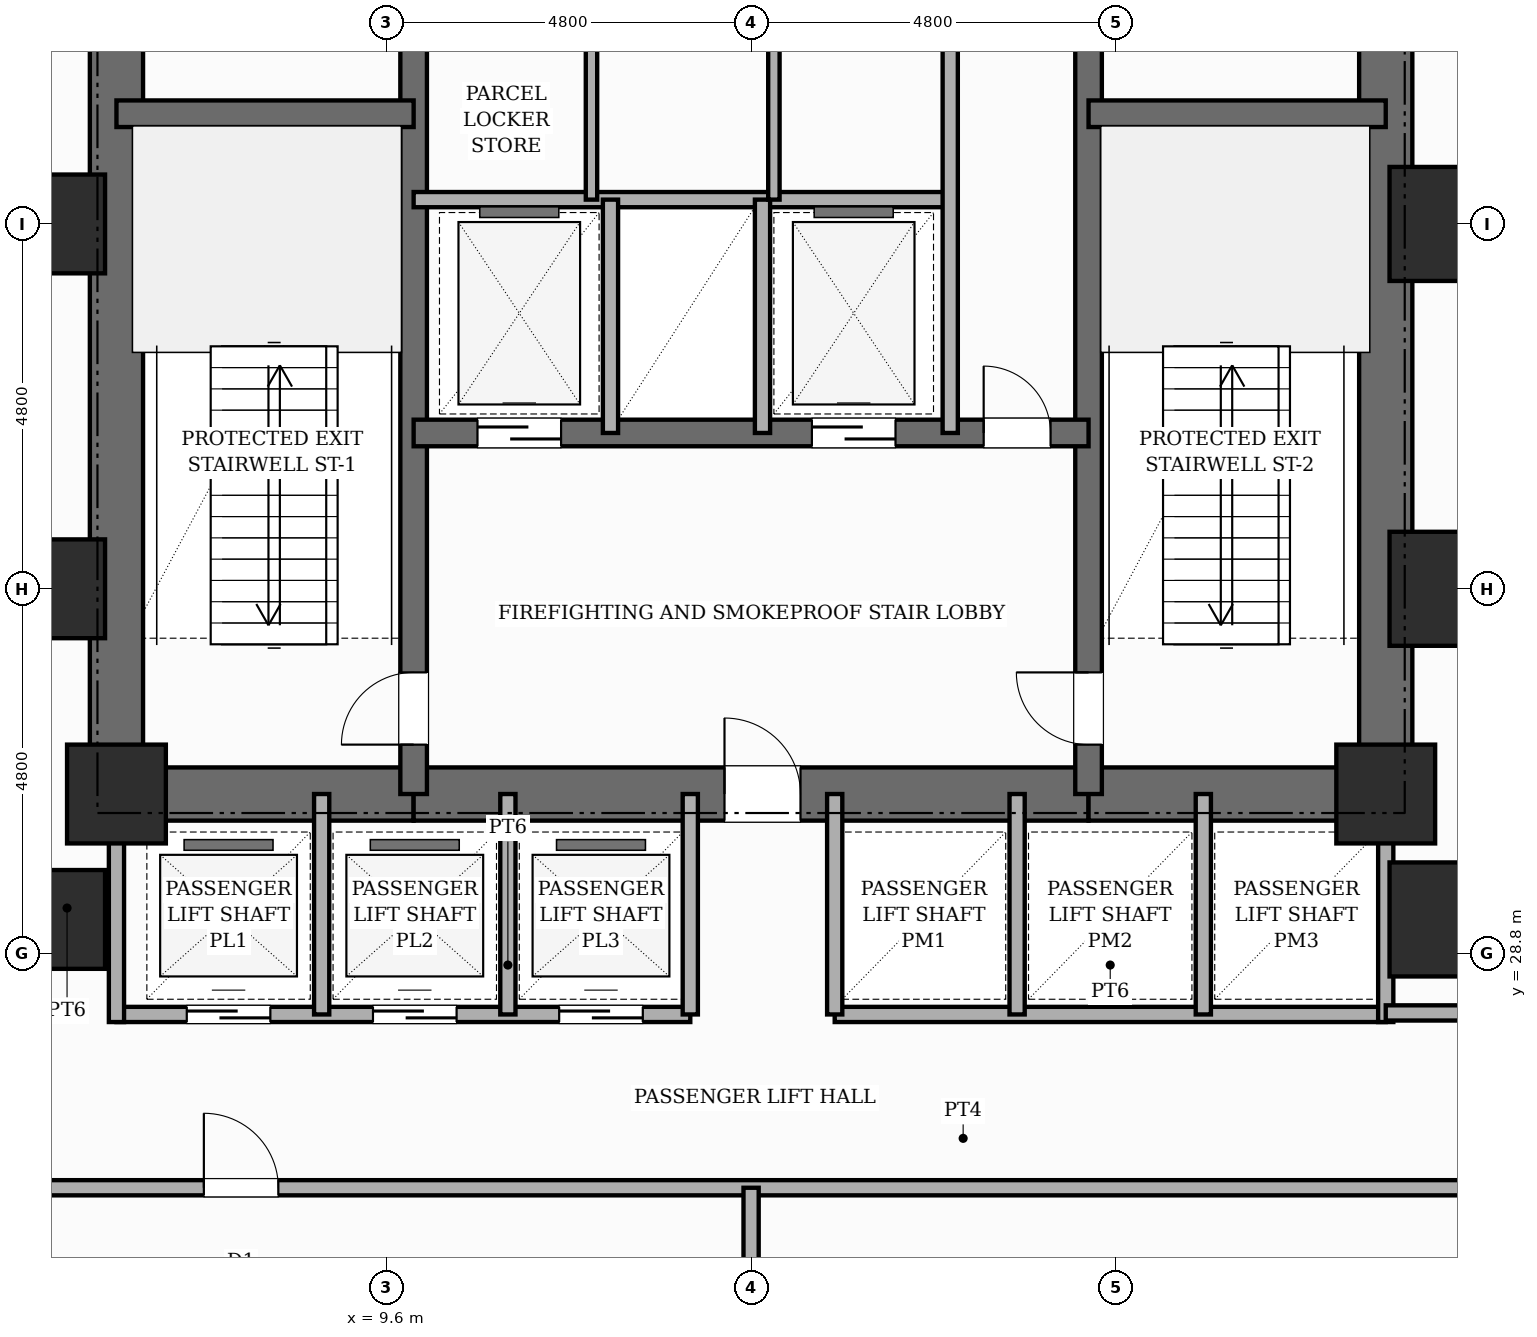
"""IFC4 building model, lengths in metres.
Left out: names, types, materials, properties, quantities, classifications, styles, units other than length and angle.
Written with IfcOpenShell. Run it as: python <this file> out.ifc"""

import sys

from ifc_helpers import new_model, si_unit, direction, frame, frame_2d, origin, origin_2d, place, context, subcontext, project, spatial, rectangle, extrude, element, fill, save


model = new_model("IFC4")
c1 = context("Model", 3, precision=1e-05, world=origin(), true_north=direction((0.0, 1.0)))
c2 = subcontext(c1, "Body", "Model", "MODEL_VIEW")
j1 = project(units=[si_unit("LENGTHUNIT", "METRE"), si_unit("PLANEANGLEUNIT", "RADIAN")], contexts=[c1])
p1 = place(None, origin())
s1 = spatial("IfcSite", under=j1, at=p1, CompositionType="ELEMENT")
p2 = place(p1, origin())
s2 = spatial("IfcBuilding", under=s1, at=p2, CompositionType="ELEMENT")
p3 = place(p2, frame((0.0, 0.0, 19.6)))
s3 = spatial("IfcBuildingStorey", under=s2, at=p3, CompositionType="ELEMENT", Elevation=19.6)
p4 = place(p3, frame((6.05, 30.55, 0.0), z_axis=(0.0, 0.0, 1.0), x_axis=(0.0, 1.0, 0.0)))
e1 = element("IfcWall", 1, at=p4, inside=s3, PredefinedType="SHEAR", context=c2, shape_type="SweptSolid", body=[
    extrude(rectangle(XDim=15.6, YDim=0.7, at=frame_2d((7.8, 0.0))), origin(), (0.0, 0.0, 1.0), 5.4),
])
p5 = place(p3, frame((22.75, 30.55, 0.0), z_axis=(0.0, 0.0, 1.0), x_axis=(0.0, 1.0, 0.0)))
e2 = element("IfcWall", 2, at=p5, inside=s3, PredefinedType="SHEAR", context=c2, shape_type="SweptSolid", body=[
    extrude(rectangle(XDim=15.6, YDim=0.7, at=frame_2d((7.8, 0.0))), origin(), (0.0, 0.0, 1.0), 5.4),
])
p6 = place(p5, frame((10.8, 0.0, 0.0)))
e3 = element("IfcOpeningElement", 3, at=p6, cuts=e2, PredefinedType="OPENING", context=c2, shape_type="SweptSolid", body=[
    extrude(rectangle(XDim=1.0, YDim=2.15, at=frame_2d((0.5, 1.075))), frame((0.0, 0.36, 0.0), z_axis=(0.0, -1.0, 0.0), x_axis=(1.0, 0.0, 0.0)), (0.0, 0.0, 1.0), 0.72),
])
p7 = place(p3, frame((6.05, 30.9, 0.0), z_axis=(0.0, 0.0, 1.0), x_axis=(1.0, 0.0, 0.0)))
e4 = element("IfcWall", 4, at=p7, inside=s3, PredefinedType="SHEAR", context=c2, shape_type="SweptSolid", body=[
    extrude(rectangle(XDim=3.91, YDim=0.7, at=frame_2d((1.955, 0.0))), origin(), (0.0, 0.0, 1.0), 5.4),
])
p8 = place(p3, frame((9.96, 30.9, 0.0), z_axis=(0.0, 0.0, 1.0), x_axis=(1.0, 0.0, 0.0)))
e5 = element("IfcWall", 5, at=p8, inside=s3, PredefinedType="SHEAR", context=c2, shape_type="SweptSolid", body=[
    extrude(rectangle(XDim=8.88, YDim=0.7, at=frame_2d((4.44, 0.0))), origin(), (0.0, 0.0, 1.0), 5.4),
])
p9 = place(p8, frame((4.09, 0.0, 0.0)))
e6 = element("IfcOpeningElement", 6, at=p9, cuts=e5, PredefinedType="OPENING", context=c2, shape_type="SweptSolid", body=[
    extrude(rectangle(XDim=1.0, YDim=2.15, at=frame_2d((0.5, 1.075))), frame((0.0, 0.36, 0.0), z_axis=(0.0, -1.0, 0.0), x_axis=(1.0, 0.0, 0.0)), (0.0, 0.0, 1.0), 0.72),
])
p10 = place(p3, frame((18.84, 30.9, 0.0), z_axis=(0.0, 0.0, 1.0), x_axis=(1.0, 0.0, 0.0)))
e7 = element("IfcWall", 7, at=p10, inside=s3, PredefinedType="SHEAR", context=c2, shape_type="SweptSolid", body=[
    extrude(rectangle(XDim=3.91, YDim=0.7, at=frame_2d((1.955, 0.0))), origin(), (0.0, 0.0, 1.0), 5.4),
])
p11 = place(p3, frame((9.96, 30.9, 0.0), z_axis=(0.0, 0.0, 1.0), x_axis=(0.0, 1.0, 0.0)))
e8 = element("IfcWall", 8, at=p11, inside=s3, PredefinedType="SHEAR", context=c2, shape_type="SweptSolid", body=[
    extrude(rectangle(XDim=14.9, YDim=0.35, at=frame_2d((7.45, 0.0))), origin(), (0.0, 0.0, 1.0), 5.4),
])
p12 = place(p11, frame((0.65, 0.0, 0.0)))
e9 = element("IfcOpeningElement", 9, at=p12, cuts=e8, PredefinedType="OPENING", context=c2, shape_type="SweptSolid", body=[
    extrude(rectangle(XDim=0.95, YDim=2.1, at=frame_2d((0.475, 1.05))), frame((0.0, 0.185, 0.0), z_axis=(0.0, -1.0, 0.0), x_axis=(1.0, 0.0, 0.0)), (0.0, 0.0, 1.0), 0.37),
])
p13 = place(p11, frame((10.45, 0.0, 0.0)))
e10 = element("IfcOpeningElement", 10, at=p13, cuts=e8, PredefinedType="OPENING", context=c2, shape_type="SweptSolid", body=[
    extrude(rectangle(XDim=1.0, YDim=2.15, at=frame_2d((0.5, 1.075))), frame((0.0, 0.185, 0.0), z_axis=(0.0, -1.0, 0.0), x_axis=(1.0, 0.0, 0.0)), (0.0, 0.0, 1.0), 0.37),
])
p14 = place(p3, frame((18.84, 30.9, 0.0), z_axis=(0.0, 0.0, 1.0), x_axis=(0.0, 1.0, 0.0)))
e11 = element("IfcWall", 11, at=p14, inside=s3, PredefinedType="SHEAR", context=c2, shape_type="SweptSolid", body=[
    extrude(rectangle(XDim=14.9, YDim=0.35, at=frame_2d((7.45, 0.0))), origin(), (0.0, 0.0, 1.0), 5.4),
])
p15 = place(p14, frame((0.65, 0.0, 0.0)))
e12 = element("IfcOpeningElement", 12, at=p15, cuts=e11, PredefinedType="OPENING", context=c2, shape_type="SweptSolid", body=[
    extrude(rectangle(XDim=0.95, YDim=2.1, at=frame_2d((0.475, 1.05))), frame((0.0, 0.185, 0.0), z_axis=(0.0, -1.0, 0.0), x_axis=(1.0, 0.0, 0.0)), (0.0, 0.0, 1.0), 0.37),
])
p16 = place(p14, frame((10.45, 0.0, 0.0)))
e13 = element("IfcOpeningElement", 13, at=p16, cuts=e11, PredefinedType="OPENING", context=c2, shape_type="SweptSolid", body=[
    extrude(rectangle(XDim=1.0, YDim=2.15, at=frame_2d((0.5, 1.075))), frame((0.0, 0.185, 0.0), z_axis=(0.0, -1.0, 0.0), x_axis=(1.0, 0.0, 0.0)), (0.0, 0.0, 1.0), 0.37),
])
for number, where, z_axis, x_axis in (
    (14, (6.05, 39.85, 0.0), (0.0, 0.0, 1.0), (1.0, 0.0, 0.0)),
    (15, (18.84, 39.85, 0.0), (0.0, 0.0, 1.0), (1.0, 0.0, 0.0)),
):
    element("IfcWall", number, at=place(p3, frame(where, z_axis=z_axis, x_axis=x_axis)), inside=s3, PredefinedType="SHEAR", context=c2, shape_type="SweptSolid", body=[
        extrude(rectangle(XDim=3.91, YDim=0.35, at=frame_2d((1.955, 0.0))), origin(), (0.0, 0.0, 1.0), 5.4),
    ])
p17 = place(p3, frame((9.96, 35.65, 0.0), z_axis=(0.0, 0.0, 1.0), x_axis=(1.0, 0.0, 0.0)))
e16 = element("IfcWall", 16, at=p17, inside=s3, PredefinedType="SHEAR", context=c2, shape_type="SweptSolid", body=[
    extrude(rectangle(XDim=8.88, YDim=0.35, at=frame_2d((4.44, 0.0))), origin(), (0.0, 0.0, 1.0), 5.4),
])
p18 = place(p17, frame((0.84, 0.0, 0.0)))
e17 = element("IfcOpeningElement", 17, at=p18, cuts=e16, PredefinedType="OPENING", context=c2, shape_type="SweptSolid", body=[
    extrude(rectangle(XDim=1.1, YDim=2.15, at=frame_2d((0.55, 1.075))), frame((0.0, 0.185, 0.0), z_axis=(0.0, -1.0, 0.0), x_axis=(1.0, 0.0, 0.0)), (0.0, 0.0, 1.0), 0.37),
])
p19 = place(p17, frame((5.24, 0.0, 0.0)))
e18 = element("IfcOpeningElement", 18, at=p19, cuts=e16, PredefinedType="OPENING", context=c2, shape_type="SweptSolid", body=[
    extrude(rectangle(XDim=1.1, YDim=2.15, at=frame_2d((0.55, 1.075))), frame((0.0, 0.185, 0.0), z_axis=(0.0, -1.0, 0.0), x_axis=(1.0, 0.0, 0.0)), (0.0, 0.0, 1.0), 0.37),
])
p20 = place(p17, frame((7.5, 0.0, 0.0)))
e19 = element("IfcOpeningElement", 19, at=p20, cuts=e16, PredefinedType="OPENING", context=c2, shape_type="SweptSolid", body=[
    extrude(rectangle(XDim=0.88, YDim=2.1, at=frame_2d((0.44, 1.05))), frame((0.0, 0.185, 0.0), z_axis=(0.0, -1.0, 0.0), x_axis=(1.0, 0.0, 0.0)), (0.0, 0.0, 1.0), 0.37),
])
for number, where, z_axis, x_axis in (
    (20, (5.25, 29.25, 0.0), (0.0, 0.0, 1.0), (1.0, 0.0, 0.0)),
    (21, (5.25, 33.6, 0.0), (0.0, 0.0, 1.0), (1.0, 0.0, 0.0)),
    (22, (5.25, 38.4, 0.0), (0.0, 0.0, 1.0), (1.0, 0.0, 0.0)),
    (23, (6.05, 30.9, 0.0), (0.0, 0.0, 1.0), (1.0, 0.0, 0.0)),
    (24, (22.75, 30.9, 0.0), (0.0, 0.0, 1.0), (1.0, 0.0, 0.0)),
):
    element("IfcColumn", number, at=place(p3, frame(where, z_axis=z_axis, x_axis=x_axis)), inside=s3, PredefinedType="COLUMN", context=c2, shape_type="SweptSolid", body=[
        extrude(rectangle(XDim=1.3, YDim=1.3, at=origin_2d()), origin(), (0.0, 0.0, 1.0), 5.4),
    ])
for number, where, z_axis, x_axis in (
    (25, (23.55, 29.25, 0.0), (0.0, 0.0, 1.0), (1.0, 0.0, 0.0)),
    (26, (23.55, 33.6, 0.0), (0.0, 0.0, 1.0), (1.0, 0.0, 0.0)),
    (27, (23.55, 38.4, 0.0), (0.0, 0.0, 1.0), (1.0, 0.0, 0.0)),
):
    element("IfcColumn", number, at=place(p3, frame(where, z_axis=z_axis, x_axis=x_axis)), inside=s3, PredefinedType="USERDEFINED", context=c2, shape_type="SweptSolid", body=[
        extrude(rectangle(XDim=1.5, YDim=1.5, at=origin_2d()), origin(), (0.0, 0.0, 1.0), 5.4),
    ])
p21 = place(p3, frame((9.96, 38.72, 0.0), z_axis=(0.0, 0.0, 1.0), x_axis=(1.0, 0.0, 0.0)))
e28 = element("IfcWall", 28, at=p21, inside=s3, PredefinedType="POLYGONAL", context=c2, shape_type="SweptSolid", body=[
    extrude(rectangle(XDim=7.06, YDim=0.2, at=frame_2d((3.53, 0.0))), origin(), (0.0, 0.0, 1.0), 5.15),
])
for number, where, z_axis, x_axis in (
    (29, (12.55, 35.65, 0.0), (0.0, 0.0, 1.0), (0.0, 1.0, 0.0)),
    (30, (14.55, 35.65, 0.0), (0.0, 0.0, 1.0), (0.0, 1.0, 0.0)),
):
    element("IfcWall", number, at=place(p3, frame(where, z_axis=z_axis, x_axis=x_axis)), inside=s3, PredefinedType="POLYGONAL", context=c2, shape_type="SweptSolid", body=[
        extrude(rectangle(XDim=3.07, YDim=0.2, at=frame_2d((1.535, 0.0))), origin(), (0.0, 0.0, 1.0), 5.15),
    ])
p22 = place(p3, frame((17.02, 35.65, 0.0), z_axis=(0.0, 0.0, 1.0), x_axis=(0.0, 1.0, 0.0)))
e31 = element("IfcWall", 31, at=p22, inside=s3, PredefinedType="POLYGONAL", context=c2, shape_type="SweptSolid", body=[
    extrude(rectangle(XDim=5.15, YDim=0.2, at=frame_2d((2.575, 0.0))), origin(), (0.0, 0.0, 1.0), 5.15),
])
for number, where, z_axis, x_axis in (
    (32, (12.3, 38.72, 0.0), (0.0, 0.0, 1.0), (0.0, 1.0, 0.0)),
    (33, (14.7, 38.72, 0.0), (0.0, 0.0, 1.0), (0.0, 1.0, 0.0)),
):
    element("IfcWall", number, at=place(p3, frame(where, z_axis=z_axis, x_axis=x_axis)), inside=s3, PredefinedType="PARTITIONING", context=c2, shape_type="SweptSolid", body=[
        extrude(rectangle(XDim=2.08, YDim=0.15, at=frame_2d((1.04, 0.0))), origin(), (0.0, 0.0, 1.0), 5.15),
    ])
p23 = place(p3, frame((6.05, 28.0, 0.0), z_axis=(0.0, 0.0, 1.0), x_axis=(1.0, 0.0, 0.0)))
e34 = element("IfcWall", 34, at=p23, inside=s3, PredefinedType="POLYGONAL", context=c2, shape_type="SweptSolid", body=[
    extrude(rectangle(XDim=7.55, YDim=0.2, at=frame_2d((3.775, 0.0))), origin(), (0.0, 0.0, 1.0), 5.15),
])
p24 = place(p23, frame((0.925, 0.0, 0.0)))
e35 = element("IfcOpeningElement", 35, at=p24, cuts=e34, PredefinedType="OPENING", context=c2, shape_type="SweptSolid", body=[
    extrude(rectangle(XDim=1.1, YDim=2.15, at=frame_2d((0.55, 1.075))), frame((0.0, 0.11, 0.0), z_axis=(0.0, -1.0, 0.0), x_axis=(1.0, 0.0, 0.0)), (0.0, 0.0, 1.0), 0.22),
])
p25 = place(p23, frame((3.375, 0.0, 0.0)))
e36 = element("IfcOpeningElement", 36, at=p25, cuts=e34, PredefinedType="OPENING", context=c2, shape_type="SweptSolid", body=[
    extrude(rectangle(XDim=1.1, YDim=2.15, at=frame_2d((0.55, 1.075))), frame((0.0, 0.11, 0.0), z_axis=(0.0, -1.0, 0.0), x_axis=(1.0, 0.0, 0.0)), (0.0, 0.0, 1.0), 0.22),
])
p26 = place(p23, frame((5.825, 0.0, 0.0)))
e37 = element("IfcOpeningElement", 37, at=p26, cuts=e34, PredefinedType="OPENING", context=c2, shape_type="SweptSolid", body=[
    extrude(rectangle(XDim=1.1, YDim=2.15, at=frame_2d((0.55, 1.075))), frame((0.0, 0.11, 0.0), z_axis=(0.0, -1.0, 0.0), x_axis=(1.0, 0.0, 0.0)), (0.0, 0.0, 1.0), 0.22),
])
p27 = place(p3, frame((15.5, 28.0, 0.0), z_axis=(0.0, 0.0, 1.0), x_axis=(1.0, 0.0, 0.0)))
e38 = element("IfcWall", 38, at=p27, inside=s3, PredefinedType="POLYGONAL", context=c2, shape_type="SweptSolid", body=[
    extrude(rectangle(XDim=7.25, YDim=0.2, at=frame_2d((3.625, 0.0))), origin(), (0.0, 0.0, 1.0), 5.15),
])
for number, where, z_axis, x_axis in (
    (39, (6.05, 27.9, 0.0), (0.0, 0.0, 1.0), (0.0, 1.0, 0.0)),
    (40, (22.75, 27.9, 0.0), (0.0, 0.0, 1.0), (0.0, 1.0, 0.0)),
):
    element("IfcWall", number, at=place(p3, frame(where, z_axis=z_axis, x_axis=x_axis)), inside=s3, PredefinedType="POLYGONAL", context=c2, shape_type="SweptSolid", body=[
        extrude(rectangle(XDim=3.0, YDim=0.2, at=frame_2d((1.5, 0.0))), origin(), (0.0, 0.0, 1.0), 5.15),
    ])
for number, where, z_axis, x_axis in (
    (41, (13.6, 28.0, 0.0), (0.0, 0.0, 1.0), (0.0, 1.0, 0.0)),
    (42, (15.5, 28.0, 0.0), (0.0, 0.0, 1.0), (0.0, 1.0, 0.0)),
    (43, (8.75, 28.0, 0.0), (0.0, 0.0, 1.0), (0.0, 1.0, 0.0)),
    (44, (11.2, 28.0, 0.0), (0.0, 0.0, 1.0), (0.0, 1.0, 0.0)),
    (45, (17.9, 28.0, 0.0), (0.0, 0.0, 1.0), (0.0, 1.0, 0.0)),
    (46, (20.35, 28.0, 0.0), (0.0, 0.0, 1.0), (0.0, 1.0, 0.0)),
):
    element("IfcWall", number, at=place(p3, frame(where, z_axis=z_axis, x_axis=x_axis)), inside=s3, PredefinedType="POLYGONAL", context=c2, shape_type="SweptSolid", body=[
        extrude(rectangle(XDim=2.9, YDim=0.2, at=frame_2d((1.45, 0.0))), origin(), (0.0, 0.0, 1.0), 5.15),
    ])
p28 = place(p3, frame((0.36, 25.72, 0.0), z_axis=(0.0, 0.0, 1.0), x_axis=(1.0, 0.0, 0.0)))
e47 = element("IfcWall", 47, at=p28, inside=s3, PredefinedType="PARTITIONING", context=c2, shape_type="SweptSolid", body=[
    extrude(rectangle(XDim=56.88, YDim=0.2, at=frame_2d((28.44, 0.0))), origin(), (0.0, 0.0, 1.0), 5.15),
])
p29 = place(p28, frame((6.84, 0.0, 0.0)))
e48 = element("IfcOpeningElement", 48, at=p29, cuts=e47, PredefinedType="OPENING", context=c2, shape_type="SweptSolid", body=[
    extrude(rectangle(XDim=0.98, YDim=2.18, at=frame_2d((0.49, 1.09))), frame((0.0, 0.11, 0.0), z_axis=(0.0, -1.0, 0.0), x_axis=(1.0, 0.0, 0.0)), (0.0, 0.0, 1.0), 0.22),
])
p30 = place(p28, frame((25.84, 0.0, 0.0)))
e49 = element("IfcOpeningElement", 49, at=p30, cuts=e47, PredefinedType="OPENING", context=c2, shape_type="SweptSolid", body=[
    extrude(rectangle(XDim=0.98, YDim=2.18, at=frame_2d((0.49, 1.09))), frame((0.0, 0.11, 0.0), z_axis=(0.0, -1.0, 0.0), x_axis=(1.0, 0.0, 0.0)), (0.0, 0.0, 1.0), 0.22),
])
p31 = place(p28, frame((36.64, 0.0, 0.0)))
e50 = element("IfcOpeningElement", 50, at=p31, cuts=e47, PredefinedType="OPENING", context=c2, shape_type="SweptSolid", body=[
    extrude(rectangle(XDim=0.98, YDim=2.18, at=frame_2d((0.49, 1.09))), frame((0.0, 0.11, 0.0), z_axis=(0.0, -1.0, 0.0), x_axis=(1.0, 0.0, 0.0)), (0.0, 0.0, 1.0), 0.22),
])
p32 = place(p28, frame((49.915, 0.0, 0.0)))
e51 = element("IfcOpeningElement", 51, at=p32, cuts=e47, PredefinedType="OPENING", context=c2, shape_type="SweptSolid", body=[
    extrude(rectangle(XDim=0.98, YDim=2.18, at=frame_2d((0.49, 1.09))), frame((0.0, 0.11, 0.0), z_axis=(0.0, -1.0, 0.0), x_axis=(1.0, 0.0, 0.0)), (0.0, 0.0, 1.0), 0.22),
])
p33 = place(p3, frame((22.75, 28.02, 0.0), z_axis=(0.0, 0.0, 1.0), x_axis=(1.0, 0.0, 0.0)))
e52 = element("IfcWall", 52, at=p33, inside=s3, PredefinedType="PARTITIONING", context=c2, shape_type="SweptSolid", body=[
    extrude(rectangle(XDim=19.03, YDim=0.2, at=frame_2d((9.515, 0.0))), origin(), (0.0, 0.0, 1.0), 5.15),
])
p34 = place(p33, frame((4.65, 0.0, 0.0)))
e53 = element("IfcOpeningElement", 53, at=p34, cuts=e52, PredefinedType="OPENING", context=c2, shape_type="SweptSolid", body=[
    extrude(rectangle(XDim=0.95, YDim=2.15, at=frame_2d((0.475, 1.075))), frame((0.0, 0.11, 0.0), z_axis=(0.0, -1.0, 0.0), x_axis=(1.0, 0.0, 0.0)), (0.0, 0.0, 1.0), 0.22),
])
p35 = place(p33, frame((12.6, 0.0, 0.0)))
e54 = element("IfcOpeningElement", 54, at=p35, cuts=e52, PredefinedType="OPENING", context=c2, shape_type="SweptSolid", body=[
    extrude(rectangle(XDim=0.86, YDim=2.1, at=frame_2d((0.43, 1.05))), frame((0.0, 0.11, 0.0), z_axis=(0.0, -1.0, 0.0), x_axis=(1.0, 0.0, 0.0)), (0.0, 0.0, 1.0), 0.22),
])
p36 = place(p33, frame((16.2, 0.0, 0.0)))
e55 = element("IfcOpeningElement", 55, at=p36, cuts=e52, PredefinedType="OPENING", context=c2, shape_type="SweptSolid", body=[
    extrude(rectangle(XDim=0.86, YDim=2.1, at=frame_2d((0.43, 1.05))), frame((0.0, 0.11, 0.0), z_axis=(0.0, -1.0, 0.0), x_axis=(1.0, 0.0, 0.0)), (0.0, 0.0, 1.0), 0.22),
])
p37 = place(p3, frame((14.4, 9.96, 0.0), z_axis=(0.0, 0.0, 1.0), x_axis=(0.0, 1.0, 0.0)))
e56 = element("IfcWall", 56, at=p37, inside=s3, PredefinedType="SOLIDWALL", context=c2, shape_type="SweptSolid", body=[
    extrude(rectangle(XDim=15.76, YDim=0.2, at=frame_2d((7.88, 0.0))), origin(), (0.0, 0.0, 1.0), 3.78),
])
p38 = place(p12, origin())
e57 = element("IfcDoor", 57, at=p38, inside=s3, OperationType="SINGLE_SWING_LEFT", PredefinedType="DOOR", context=c2, shape_type="SweptSolid", body=[
    extrude(rectangle(XDim=0.95, YDim=2.1, at=frame_2d((0.475, 1.05))), frame((0.0, 0.025, 0.0), z_axis=(0.0, -1.0, 0.0), x_axis=(1.0, 0.0, 0.0)), (0.0, 0.0, 1.0), 0.05),
])
fill(e9, e57)
p39 = place(p15, origin())
e58 = element("IfcDoor", 58, at=p39, inside=s3, OperationType="SINGLE_SWING_RIGHT", PredefinedType="DOOR", context=c2, shape_type="SweptSolid", body=[
    extrude(rectangle(XDim=0.95, YDim=2.1, at=frame_2d((0.475, 1.05))), frame((0.0, 0.025, 0.0), z_axis=(0.0, -1.0, 0.0), x_axis=(1.0, 0.0, 0.0)), (0.0, 0.0, 1.0), 0.05),
])
fill(e12, e58)
p40 = place(p9, origin())
e59 = element("IfcDoor", 59, at=p40, inside=s3, OperationType="SINGLE_SWING_LEFT", PredefinedType="DOOR", context=c2, shape_type="SweptSolid", body=[
    extrude(rectangle(XDim=1.0, YDim=2.15, at=frame_2d((0.5, 1.075))), frame((0.0, 0.025, 0.0), z_axis=(0.0, -1.0, 0.0), x_axis=(1.0, 0.0, 0.0)), (0.0, 0.0, 1.0), 0.05),
])
fill(e6, e59)
p41 = place(p18, origin())
e60 = element("IfcDoor", 60, at=p41, inside=s3, OperationType="SLIDING_TO_LEFT", PredefinedType="DOOR", context=c2, shape_type="SweptSolid", body=[
    extrude(rectangle(XDim=1.1, YDim=2.15, at=frame_2d((0.55, 1.075))), frame((0.0, 0.025, 0.0), z_axis=(0.0, -1.0, 0.0), x_axis=(1.0, 0.0, 0.0)), (0.0, 0.0, 1.0), 0.05),
])
fill(e17, e60)
p42 = place(p19, origin())
e61 = element("IfcDoor", 61, at=p42, inside=s3, OperationType="SLIDING_TO_RIGHT", PredefinedType="DOOR", context=c2, shape_type="SweptSolid", body=[
    extrude(rectangle(XDim=1.1, YDim=2.15, at=frame_2d((0.55, 1.075))), frame((0.0, 0.025, 0.0), z_axis=(0.0, -1.0, 0.0), x_axis=(1.0, 0.0, 0.0)), (0.0, 0.0, 1.0), 0.05),
])
fill(e18, e61)
p43 = place(p20, origin())
e62 = element("IfcDoor", 62, at=p43, inside=s3, OperationType="SINGLE_SWING_LEFT", PredefinedType="DOOR", context=c2, shape_type="SweptSolid", body=[
    extrude(rectangle(XDim=0.88, YDim=2.1, at=frame_2d((0.44, 1.05))), frame((0.0, 0.025, 0.0), z_axis=(0.0, -1.0, 0.0), x_axis=(1.0, 0.0, 0.0)), (0.0, 0.0, 1.0), 0.05),
])
fill(e19, e62)
p44 = place(p24, origin())
e63 = element("IfcDoor", 63, at=p44, inside=s3, OperationType="SLIDING_TO_LEFT", PredefinedType="DOOR", context=c2, shape_type="SweptSolid", body=[
    extrude(rectangle(XDim=1.1, YDim=2.15, at=frame_2d((0.55, 1.075))), frame((0.0, 0.025, 0.0), z_axis=(0.0, -1.0, 0.0), x_axis=(1.0, 0.0, 0.0)), (0.0, 0.0, 1.0), 0.05),
])
fill(e35, e63)
p45 = place(p25, origin())
e64 = element("IfcDoor", 64, at=p45, inside=s3, OperationType="SLIDING_TO_RIGHT", PredefinedType="DOOR", context=c2, shape_type="SweptSolid", body=[
    extrude(rectangle(XDim=1.1, YDim=2.15, at=frame_2d((0.55, 1.075))), frame((0.0, 0.025, 0.0), z_axis=(0.0, -1.0, 0.0), x_axis=(1.0, 0.0, 0.0)), (0.0, 0.0, 1.0), 0.05),
])
fill(e36, e64)
p46 = place(p26, origin())
e65 = element("IfcDoor", 65, at=p46, inside=s3, OperationType="SLIDING_TO_LEFT", PredefinedType="DOOR", context=c2, shape_type="SweptSolid", body=[
    extrude(rectangle(XDim=1.1, YDim=2.15, at=frame_2d((0.55, 1.075))), frame((0.0, 0.025, 0.0), z_axis=(0.0, -1.0, 0.0), x_axis=(1.0, 0.0, 0.0)), (0.0, 0.0, 1.0), 0.05),
])
fill(e37, e65)
p47 = place(p29, origin())
e66 = element("IfcDoor", 66, at=p47, inside=s3, OperationType="SINGLE_SWING_LEFT", PredefinedType="DOOR", context=c2, shape_type="SweptSolid", body=[
    extrude(rectangle(XDim=0.98, YDim=2.18, at=frame_2d((0.49, 1.09))), frame((0.0, 0.025, 0.0), z_axis=(0.0, -1.0, 0.0), x_axis=(1.0, 0.0, 0.0)), (0.0, 0.0, 1.0), 0.05),
])
fill(e48, e66)
save(model, sys.argv[1])
